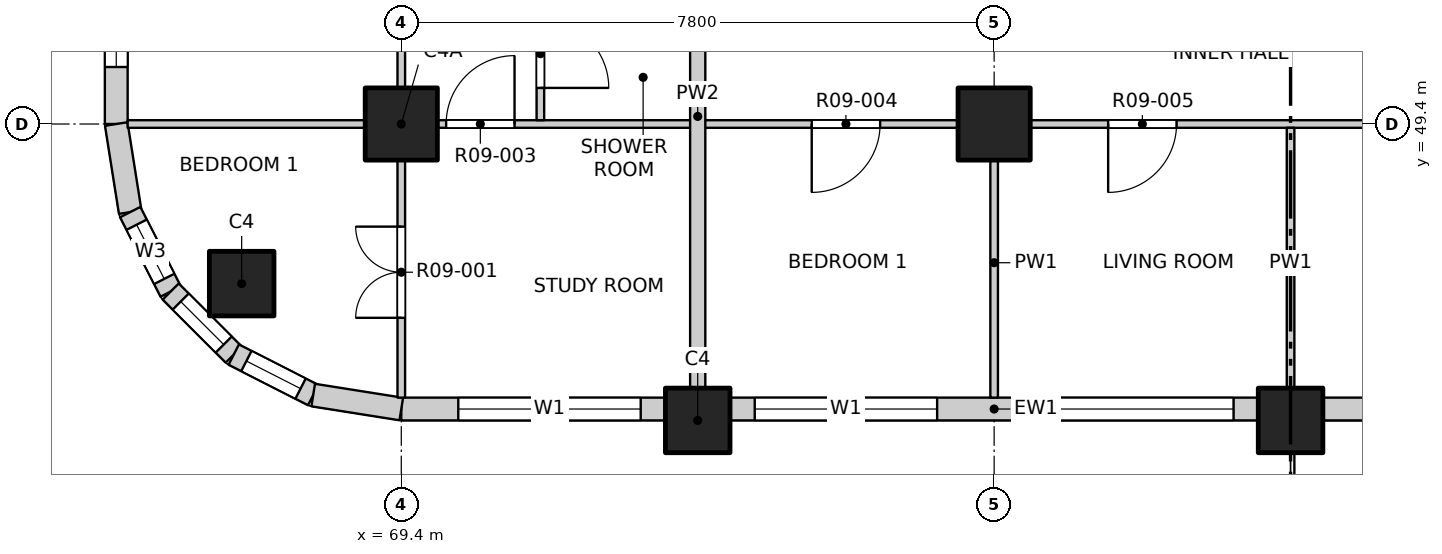
"""IFC4 building model, lengths in metres.
Left out: names, types, materials, properties, quantities, classifications, styles, units other than length and angle.
Written with IfcOpenShell. Run it as: python <this file> out.ifc"""

import sys

from ifc_helpers import new_model, si_unit, direction, frame, frame_2d, origin, origin_2d, place, context, subcontext, project, spatial, rectangle, extrude, element, fill, save


model = new_model("IFC4")
c1 = context("Model", 3, precision=1e-05, world=origin(), true_north=direction((0.0, 1.0)))
c2 = subcontext(c1, "Body", "Model", "MODEL_VIEW")
j1 = project(units=[si_unit("LENGTHUNIT", "METRE"), si_unit("PLANEANGLEUNIT", "RADIAN")], contexts=[c1])
p1 = place(None, origin())
s1 = spatial("IfcSite", under=j1, at=p1, CompositionType="ELEMENT")
p2 = place(p1, origin())
s2 = spatial("IfcBuilding", under=s1, at=p2, CompositionType="ELEMENT")
p3 = place(p2, frame((0.0, 0.0, 113.5)))
s3 = spatial("IfcBuildingStorey", under=s2, at=p3, CompositionType="ELEMENT", Elevation=113.5)
for number, where, z_axis, x_axis in (
    (1, (67.3, 47.3, -0.25), (0.0, 0.0, 1.0), (1.0, 0.0, 0.0)),
    (2, (73.3, 45.5, -0.25), (0.0, 0.0, 1.0), (1.0, 0.0, 0.0)),
    (3, (81.1, 45.5, -0.25), (0.0, 0.0, 1.0), (1.0, 0.0, 0.0)),
):
    element("IfcColumn", number, at=place(p3, frame(where, z_axis=z_axis, x_axis=x_axis)), inside=s3, PredefinedType="COLUMN", context=c2, shape_type="SweptSolid", body=[
        extrude(rectangle(XDim=0.85, YDim=0.85, at=origin_2d()), origin(), (0.0, 0.0, 1.0), 3.35),
    ])
for number, where, z_axis, x_axis in (
    (4, (69.4, 49.4, -0.25), (0.0, 0.0, 1.0), (1.0, 0.0, 0.0)),
    (5, (77.2, 49.4, -0.25), (0.0, 0.0, 1.0), (1.0, 0.0, 0.0)),
):
    element("IfcColumn", number, at=place(p3, frame(where, z_axis=z_axis, x_axis=x_axis)), inside=s3, PredefinedType="COLUMN", context=c2, shape_type="SweptSolid", body=[
        extrude(rectangle(XDim=0.95, YDim=0.95, at=origin_2d()), origin(), (0.0, 0.0, 1.0), 3.35),
    ])
p4 = place(p3, frame((69.4, 45.65, 0.0), z_axis=(0.0, 0.0, 1.0), x_axis=(1.0, 0.0, 0.0)))
e6 = element("IfcWall", 6, at=p4, inside=s3, PredefinedType="SOLIDWALL", context=c2, shape_type="SweptSolid", body=[
    extrude(rectangle(XDim=3.475, YDim=0.3, at=frame_2d((1.738, 0.0))), origin(), (0.0, 0.0, 1.0), 3.1),
])
p5 = place(p4, frame((0.75, 0.0, 0.9)))
e7 = element("IfcOpeningElement", 7, at=p5, cuts=e6, PredefinedType="OPENING", context=c2, shape_type="SweptSolid", body=[
    extrude(rectangle(XDim=2.4, YDim=1.8, at=frame_2d((1.2, 0.9))), frame((0.0, 0.16, 0.0), z_axis=(0.0, -1.0, 0.0), x_axis=(1.0, 0.0, 0.0)), (0.0, 0.0, 1.0), 0.32),
])
p6 = place(p3, frame((73.725, 45.65, 0.0), z_axis=(0.0, 0.0, 1.0), x_axis=(1.0, 0.0, 0.0)))
e8 = element("IfcWall", 8, at=p6, inside=s3, PredefinedType="SOLIDWALL", context=c2, shape_type="SweptSolid", body=[
    extrude(rectangle(XDim=6.95, YDim=0.3, at=frame_2d((3.475, 0.0))), origin(), (0.0, 0.0, 1.0), 3.1),
])
p7 = place(p6, frame((0.325, 0.0, 0.9)))
e9 = element("IfcOpeningElement", 9, at=p7, cuts=e8, PredefinedType="OPENING", context=c2, shape_type="SweptSolid", body=[
    extrude(rectangle(XDim=2.4, YDim=1.8, at=frame_2d((1.2, 0.9))), frame((0.0, 0.16, 0.0), z_axis=(0.0, -1.0, 0.0), x_axis=(1.0, 0.0, 0.0)), (0.0, 0.0, 1.0), 0.32),
])
p8 = place(p6, frame((4.225, 0.0, 0.9)))
e10 = element("IfcOpeningElement", 10, at=p8, cuts=e8, PredefinedType="OPENING", context=c2, shape_type="SweptSolid", body=[
    extrude(rectangle(XDim=2.4, YDim=1.8, at=frame_2d((1.2, 0.9))), frame((0.0, 0.16, 0.0), z_axis=(0.0, -1.0, 0.0), x_axis=(1.0, 0.0, 0.0)), (0.0, 0.0, 1.0), 0.32),
])
p9 = place(p3, frame((81.525, 45.65, 0.0), z_axis=(0.0, 0.0, 1.0), x_axis=(1.0, 0.0, 0.0)))
e11 = element("IfcWall", 11, at=p9, inside=s3, PredefinedType="SOLIDWALL", context=c2, shape_type="SweptSolid", body=[
    extrude(rectangle(XDim=6.95, YDim=0.3, at=frame_2d((3.475, 0.0))), origin(), (0.0, 0.0, 1.0), 3.1),
])
p10 = place(p9, frame((0.625, 0.0, 0.0)))
e12 = element("IfcOpeningElement", 12, at=p10, cuts=e11, PredefinedType="OPENING", context=c2, shape_type="SweptSolid", body=[
    extrude(rectangle(XDim=1.8, YDim=2.4, at=frame_2d((0.9, 1.2))), frame((0.0, 0.16, 0.0), z_axis=(0.0, -1.0, 0.0), x_axis=(1.0, 0.0, 0.0)), (0.0, 0.0, 1.0), 0.32),
])
p11 = place(p9, frame((4.225, 0.0, 0.9)))
e13 = element("IfcOpeningElement", 13, at=p11, cuts=e11, PredefinedType="OPENING", context=c2, shape_type="SweptSolid", body=[
    extrude(rectangle(XDim=2.4, YDim=1.8, at=frame_2d((1.2, 0.9))), frame((0.0, 0.16, 0.0), z_axis=(0.0, -1.0, 0.0), x_axis=(1.0, 0.0, 0.0)), (0.0, 0.0, 1.0), 0.32),
])
p12 = place(p3, frame((65.65, 49.4, 0.0), z_axis=(0.0, 0.0, 1.0), x_axis=(0.0, 1.0, 0.0)))
e14 = element("IfcWall", 14, at=p12, inside=s3, PredefinedType="SOLIDWALL", context=c2, shape_type="SweptSolid", body=[
    extrude(rectangle(XDim=3.475, YDim=0.3, at=frame_2d((1.738, 0.0))), origin(), (0.0, 0.0, 1.0), 3.1),
])
p13 = place(p12, frame((0.75, 0.0, 0.9)))
e15 = element("IfcOpeningElement", 15, at=p13, cuts=e14, PredefinedType="OPENING", context=c2, shape_type="SweptSolid", body=[
    extrude(rectangle(XDim=2.4, YDim=1.8, at=frame_2d((1.2, 0.9))), frame((0.0, 0.16, 0.0), z_axis=(0.0, -1.0, 0.0), x_axis=(1.0, 0.0, 0.0)), (0.0, 0.0, 1.0), 0.32),
])
p14 = place(p3, frame((65.65, 49.4, 0.0), z_axis=(0.0, 0.0, 1.0), x_axis=(0.156496880861, -0.987678452879, 0.0)))
e16 = element("IfcWall", 16, at=p14, inside=s3, PredefinedType="SOLIDWALL", context=c2, shape_type="SweptSolid", body=[
    extrude(rectangle(XDim=1.173, YDim=0.3, at=frame_2d((0.586, 0.0))), origin(), (0.0, 0.0, 1.0), 3.1),
])
p15 = place(p3, frame((65.833, 48.241, 0.0), z_axis=(0.0, 0.0, 1.0), x_axis=(0.454025524128, -0.890988677504, 0.0)))
e17 = element("IfcWall", 17, at=p15, inside=s3, PredefinedType="SOLIDWALL", context=c2, shape_type="SweptSolid", body=[
    extrude(rectangle(XDim=1.173, YDim=0.3, at=frame_2d((0.587, 0.0))), origin(), (0.0, 0.0, 1.0), 3.1),
])
p16 = place(p15, frame((0.187, 0.0, 0.9)))
e18 = element("IfcOpeningElement", 18, at=p16, cuts=e17, PredefinedType="OPENING", context=c2, shape_type="SweptSolid", body=[
    extrude(rectangle(XDim=0.8, YDim=1.2, at=frame_2d((0.4, 0.6))), frame((0.0, 0.16, 0.0), z_axis=(0.0, -1.0, 0.0), x_axis=(1.0, 0.0, 0.0)), (0.0, 0.0, 1.0), 0.32),
])
p17 = place(p3, frame((66.366, 47.196, 0.0), z_axis=(0.0, 0.0, 1.0), x_axis=(0.707106781187, -0.707106781187, 0.0)))
e19 = element("IfcWall", 19, at=p17, inside=s3, PredefinedType="SOLIDWALL", context=c2, shape_type="SweptSolid", body=[
    extrude(rectangle(XDim=1.173, YDim=0.3, at=frame_2d((0.586, 0.0))), origin(), (0.0, 0.0, 1.0), 3.1),
])
p18 = place(p17, frame((0.187, 0.0, 0.9)))
e20 = element("IfcOpeningElement", 20, at=p18, cuts=e19, PredefinedType="OPENING", context=c2, shape_type="SweptSolid", body=[
    extrude(rectangle(XDim=0.8, YDim=1.2, at=frame_2d((0.4, 0.6))), frame((0.0, 0.16, 0.0), z_axis=(0.0, -1.0, 0.0), x_axis=(1.0, 0.0, 0.0)), (0.0, 0.0, 1.0), 0.32),
])
p19 = place(p3, frame((67.196, 46.366, 0.0), z_axis=(0.0, 0.0, 1.0), x_axis=(0.890988677504, -0.454025524128, 0.0)))
e21 = element("IfcWall", 21, at=p19, inside=s3, PredefinedType="SOLIDWALL", context=c2, shape_type="SweptSolid", body=[
    extrude(rectangle(XDim=1.173, YDim=0.3, at=frame_2d((0.587, 0.0))), origin(), (0.0, 0.0, 1.0), 3.1),
])
p20 = place(p19, frame((0.187, 0.0, 0.9)))
e22 = element("IfcOpeningElement", 22, at=p20, cuts=e21, PredefinedType="OPENING", context=c2, shape_type="SweptSolid", body=[
    extrude(rectangle(XDim=0.8, YDim=1.2, at=frame_2d((0.4, 0.6))), frame((0.0, 0.16, 0.0), z_axis=(0.0, -1.0, 0.0), x_axis=(1.0, 0.0, 0.0)), (0.0, 0.0, 1.0), 0.32),
])
p21 = place(p3, frame((68.241, 45.833, 0.0), z_axis=(0.0, 0.0, 1.0), x_axis=(0.987678452879, -0.156496880861, 0.0)))
e23 = element("IfcWall", 23, at=p21, inside=s3, PredefinedType="SOLIDWALL", context=c2, shape_type="SweptSolid", body=[
    extrude(rectangle(XDim=1.173, YDim=0.3, at=frame_2d((0.586, 0.0))), origin(), (0.0, 0.0, 1.0), 3.1),
])
p22 = place(p3, frame((65.8, 49.4, 0.0), z_axis=(0.0, 0.0, 1.0), x_axis=(1.0, 0.0, 0.0)))
e24 = element("IfcWall", 24, at=p22, inside=s3, PredefinedType="PARTITIONING", context=c2, shape_type="SweptSolid", body=[
    extrude(rectangle(XDim=38.4, YDim=0.1, at=frame_2d((19.2, 0.0))), origin(), (0.0, 0.0, 1.0), 3.1),
])
p23 = place(p22, frame((4.19, 0.0, 0.0)))
e25 = element("IfcOpeningElement", 25, at=p23, cuts=e24, PredefinedType="OPENING", context=c2, shape_type="SweptSolid", body=[
    extrude(rectangle(XDim=0.9, YDim=2.1, at=frame_2d((0.45, 1.05))), frame((0.0, 0.06, 0.0), z_axis=(0.0, -1.0, 0.0), x_axis=(1.0, 0.0, 0.0)), (0.0, 0.0, 1.0), 0.12),
])
p24 = place(p22, frame((9.0, 0.0, 0.0)))
e26 = element("IfcOpeningElement", 26, at=p24, cuts=e24, PredefinedType="OPENING", context=c2, shape_type="SweptSolid", body=[
    extrude(rectangle(XDim=0.9, YDim=2.1, at=frame_2d((0.45, 1.05))), frame((0.0, 0.06, 0.0), z_axis=(0.0, -1.0, 0.0), x_axis=(1.0, 0.0, 0.0)), (0.0, 0.0, 1.0), 0.12),
])
p25 = place(p22, frame((12.9, 0.0, 0.0)))
e27 = element("IfcOpeningElement", 27, at=p25, cuts=e24, PredefinedType="OPENING", context=c2, shape_type="SweptSolid", body=[
    extrude(rectangle(XDim=0.9, YDim=2.1, at=frame_2d((0.45, 1.05))), frame((0.0, 0.06, 0.0), z_axis=(0.0, -1.0, 0.0), x_axis=(1.0, 0.0, 0.0)), (0.0, 0.0, 1.0), 0.12),
])
p26 = place(p22, frame((16.8, 0.0, 0.0)))
e28 = element("IfcOpeningElement", 28, at=p26, cuts=e24, PredefinedType="OPENING", context=c2, shape_type="SweptSolid", body=[
    extrude(rectangle(XDim=0.9, YDim=2.1, at=frame_2d((0.45, 1.05))), frame((0.0, 0.06, 0.0), z_axis=(0.0, -1.0, 0.0), x_axis=(1.0, 0.0, 0.0)), (0.0, 0.0, 1.0), 0.12),
])
p27 = place(p22, frame((20.7, 0.0, 0.0)))
e29 = element("IfcOpeningElement", 29, at=p27, cuts=e24, PredefinedType="OPENING", context=c2, shape_type="SweptSolid", body=[
    extrude(rectangle(XDim=0.9, YDim=2.1, at=frame_2d((0.45, 1.05))), frame((0.0, 0.06, 0.0), z_axis=(0.0, -1.0, 0.0), x_axis=(1.0, 0.0, 0.0)), (0.0, 0.0, 1.0), 0.12),
])
p28 = place(p22, frame((24.6, 0.0, 0.0)))
e30 = element("IfcOpeningElement", 30, at=p28, cuts=e24, PredefinedType="OPENING", context=c2, shape_type="SweptSolid", body=[
    extrude(rectangle(XDim=0.9, YDim=2.1, at=frame_2d((0.45, 1.05))), frame((0.0, 0.06, 0.0), z_axis=(0.0, -1.0, 0.0), x_axis=(1.0, 0.0, 0.0)), (0.0, 0.0, 1.0), 0.12),
])
p29 = place(p22, frame((28.5, 0.0, 0.0)))
e31 = element("IfcOpeningElement", 31, at=p29, cuts=e24, PredefinedType="OPENING", context=c2, shape_type="SweptSolid", body=[
    extrude(rectangle(XDim=0.9, YDim=2.1, at=frame_2d((0.45, 1.05))), frame((0.0, 0.06, 0.0), z_axis=(0.0, -1.0, 0.0), x_axis=(1.0, 0.0, 0.0)), (0.0, 0.0, 1.0), 0.12),
])
p30 = place(p22, frame((33.31, 0.0, 0.0)))
e32 = element("IfcOpeningElement", 32, at=p30, cuts=e24, PredefinedType="OPENING", context=c2, shape_type="SweptSolid", body=[
    extrude(rectangle(XDim=0.9, YDim=2.1, at=frame_2d((0.45, 1.05))), frame((0.0, 0.06, 0.0), z_axis=(0.0, -1.0, 0.0), x_axis=(1.0, 0.0, 0.0)), (0.0, 0.0, 1.0), 0.12),
])
p31 = place(p3, frame((69.4, 45.8, 0.0), z_axis=(0.0, 0.0, 1.0), x_axis=(0.0, 1.0, 0.0)))
e33 = element("IfcWall", 33, at=p31, inside=s3, PredefinedType="PARTITIONING", context=c2, shape_type="SweptSolid", body=[
    extrude(rectangle(XDim=38.4, YDim=0.1, at=frame_2d((19.2, 0.0))), origin(), (0.0, 0.0, 1.0), 3.1),
])
p32 = place(p31, frame((1.05, 0.0, 0.0)))
e34 = element("IfcOpeningElement", 34, at=p32, cuts=e33, PredefinedType="OPENING", context=c2, shape_type="SweptSolid", body=[
    extrude(rectangle(XDim=1.2, YDim=2.1, at=frame_2d((0.6, 1.05))), frame((0.0, 0.06, 0.0), z_axis=(0.0, -1.0, 0.0), x_axis=(1.0, 0.0, 0.0)), (0.0, 0.0, 1.0), 0.12),
])
p33 = place(p31, frame((5.1, 0.0, 0.0)))
e35 = element("IfcOpeningElement", 35, at=p33, cuts=e33, PredefinedType="OPENING", context=c2, shape_type="SweptSolid", body=[
    extrude(rectangle(XDim=0.9, YDim=2.1, at=frame_2d((0.45, 1.05))), frame((0.0, 0.06, 0.0), z_axis=(0.0, -1.0, 0.0), x_axis=(1.0, 0.0, 0.0)), (0.0, 0.0, 1.0), 0.12),
])
p34 = place(p31, frame((9.0, 0.0, 0.0)))
e36 = element("IfcOpeningElement", 36, at=p34, cuts=e33, PredefinedType="OPENING", context=c2, shape_type="SweptSolid", body=[
    extrude(rectangle(XDim=0.9, YDim=2.1, at=frame_2d((0.45, 1.05))), frame((0.0, 0.06, 0.0), z_axis=(0.0, -1.0, 0.0), x_axis=(1.0, 0.0, 0.0)), (0.0, 0.0, 1.0), 0.12),
])
p35 = place(p31, frame((12.9, 0.0, 0.0)))
e37 = element("IfcOpeningElement", 37, at=p35, cuts=e33, PredefinedType="OPENING", context=c2, shape_type="SweptSolid", body=[
    extrude(rectangle(XDim=0.9, YDim=2.1, at=frame_2d((0.45, 1.05))), frame((0.0, 0.06, 0.0), z_axis=(0.0, -1.0, 0.0), x_axis=(1.0, 0.0, 0.0)), (0.0, 0.0, 1.0), 0.12),
])
p36 = place(p31, frame((16.8, 0.0, 0.0)))
e38 = element("IfcOpeningElement", 38, at=p36, cuts=e33, PredefinedType="OPENING", context=c2, shape_type="SweptSolid", body=[
    extrude(rectangle(XDim=0.9, YDim=2.1, at=frame_2d((0.45, 1.05))), frame((0.0, 0.06, 0.0), z_axis=(0.0, -1.0, 0.0), x_axis=(1.0, 0.0, 0.0)), (0.0, 0.0, 1.0), 0.12),
])
p37 = place(p31, frame((20.7, 0.0, 0.0)))
e39 = element("IfcOpeningElement", 39, at=p37, cuts=e33, PredefinedType="OPENING", context=c2, shape_type="SweptSolid", body=[
    extrude(rectangle(XDim=0.9, YDim=2.1, at=frame_2d((0.45, 1.05))), frame((0.0, 0.06, 0.0), z_axis=(0.0, -1.0, 0.0), x_axis=(1.0, 0.0, 0.0)), (0.0, 0.0, 1.0), 0.12),
])
p38 = place(p31, frame((24.6, 0.0, 0.0)))
e40 = element("IfcOpeningElement", 40, at=p38, cuts=e33, PredefinedType="OPENING", context=c2, shape_type="SweptSolid", body=[
    extrude(rectangle(XDim=0.9, YDim=2.1, at=frame_2d((0.45, 1.05))), frame((0.0, 0.06, 0.0), z_axis=(0.0, -1.0, 0.0), x_axis=(1.0, 0.0, 0.0)), (0.0, 0.0, 1.0), 0.12),
])
p39 = place(p31, frame((28.5, 0.0, 0.0)))
e41 = element("IfcOpeningElement", 41, at=p39, cuts=e33, PredefinedType="OPENING", context=c2, shape_type="SweptSolid", body=[
    extrude(rectangle(XDim=0.9, YDim=2.1, at=frame_2d((0.45, 1.05))), frame((0.0, 0.06, 0.0), z_axis=(0.0, -1.0, 0.0), x_axis=(1.0, 0.0, 0.0)), (0.0, 0.0, 1.0), 0.12),
])
p40 = place(p31, frame((32.4, 0.0, 0.0)))
e42 = element("IfcOpeningElement", 42, at=p40, cuts=e33, PredefinedType="OPENING", context=c2, shape_type="SweptSolid", body=[
    extrude(rectangle(XDim=0.9, YDim=2.1, at=frame_2d((0.45, 1.05))), frame((0.0, 0.06, 0.0), z_axis=(0.0, -1.0, 0.0), x_axis=(1.0, 0.0, 0.0)), (0.0, 0.0, 1.0), 0.12),
])
p41 = place(p31, frame((36.15, 0.0, 0.0)))
e43 = element("IfcOpeningElement", 43, at=p41, cuts=e33, PredefinedType="OPENING", context=c2, shape_type="SweptSolid", body=[
    extrude(rectangle(XDim=1.2, YDim=2.1, at=frame_2d((0.6, 1.05))), frame((0.0, 0.06, 0.0), z_axis=(0.0, -1.0, 0.0), x_axis=(1.0, 0.0, 0.0)), (0.0, 0.0, 1.0), 0.12),
])
p42 = place(p3, frame((71.23, 49.45, 0.0), z_axis=(0.0, 0.0, 1.0), x_axis=(0.0, 1.0, 0.0)))
e44 = element("IfcWall", 44, at=p42, inside=s3, PredefinedType="PARTITIONING", context=c2, shape_type="SweptSolid", body=[
    extrude(rectangle(XDim=4.65, YDim=0.1, at=frame_2d((2.325, 0.0))), origin(), (0.0, 0.0, 1.0), 3.1),
])
p43 = place(p42, frame((0.425, 0.0, 0.0)))
e45 = element("IfcOpeningElement", 45, at=p43, cuts=e44, PredefinedType="OPENING", context=c2, shape_type="SweptSolid", body=[
    extrude(rectangle(XDim=0.9, YDim=2.1, at=frame_2d((0.45, 1.05))), frame((0.0, 0.06, 0.0), z_axis=(0.0, -1.0, 0.0), x_axis=(1.0, 0.0, 0.0)), (0.0, 0.0, 1.0), 0.12),
])
p44 = place(p42, frame((2.85, 0.0, 0.0)))
e46 = element("IfcOpeningElement", 46, at=p44, cuts=e44, PredefinedType="OPENING", context=c2, shape_type="SweptSolid", body=[
    extrude(rectangle(XDim=0.8, YDim=2.1, at=frame_2d((0.4, 1.05))), frame((0.0, 0.06, 0.0), z_axis=(0.0, -1.0, 0.0), x_axis=(1.0, 0.0, 0.0)), (0.0, 0.0, 1.0), 0.12),
])
p45 = place(p3, frame((73.3, 45.8, 0.0), z_axis=(0.0, 0.0, 1.0), x_axis=(0.0, 1.0, 0.0)))
e47 = element("IfcWall", 47, at=p45, inside=s3, PredefinedType="PARTITIONING", context=c2, shape_type="SweptSolid", body=[
    extrude(rectangle(XDim=7.4, YDim=0.2, at=frame_2d((3.7, 0.0))), origin(), (0.0, 0.0, 1.0), 3.1),
])
for number, where, z_axis, x_axis in (
    (48, (77.2, 45.8, 0.0), (0.0, 0.0, 1.0), (0.0, 1.0, 0.0)),
    (49, (81.1, 45.8, 0.0), (0.0, 0.0, 1.0), (0.0, 1.0, 0.0)),
):
    element("IfcWall", number, at=place(p3, frame(where, z_axis=z_axis, x_axis=x_axis)), inside=s3, PredefinedType="PARTITIONING", context=c2, shape_type="SweptSolid", body=[
        extrude(rectangle(XDim=3.55, YDim=0.1, at=frame_2d((1.775, 0.0))), origin(), (0.0, 0.0, 1.0), 3.1),
    ])
p46 = place(p5, origin())
e50 = element("IfcWindow", 50, at=p46, inside=s3, PartitioningType="DOUBLE_PANEL_VERTICAL", PredefinedType="WINDOW", context=c2, shape_type="SweptSolid", body=[
    extrude(rectangle(XDim=2.4, YDim=1.8, at=frame_2d((1.2, 0.9))), frame((0.0, 0.03, 0.0), z_axis=(0.0, -1.0, 0.0), x_axis=(1.0, 0.0, 0.0)), (0.0, 0.0, 1.0), 0.06),
])
fill(e7, e50)
p47 = place(p7, origin())
e51 = element("IfcWindow", 51, at=p47, inside=s3, PartitioningType="DOUBLE_PANEL_VERTICAL", PredefinedType="WINDOW", context=c2, shape_type="SweptSolid", body=[
    extrude(rectangle(XDim=2.4, YDim=1.8, at=frame_2d((1.2, 0.9))), frame((0.0, 0.03, 0.0), z_axis=(0.0, -1.0, 0.0), x_axis=(1.0, 0.0, 0.0)), (0.0, 0.0, 1.0), 0.06),
])
fill(e9, e51)
p48 = place(p8, origin())
e52 = element("IfcWindow", 52, at=p48, inside=s3, PartitioningType="DOUBLE_PANEL_VERTICAL", PredefinedType="WINDOW", context=c2, shape_type="SweptSolid", body=[
    extrude(rectangle(XDim=2.4, YDim=1.8, at=frame_2d((1.2, 0.9))), frame((0.0, 0.03, 0.0), z_axis=(0.0, -1.0, 0.0), x_axis=(1.0, 0.0, 0.0)), (0.0, 0.0, 1.0), 0.06),
])
fill(e10, e52)
p49 = place(p13, origin())
e53 = element("IfcWindow", 53, at=p49, inside=s3, PartitioningType="DOUBLE_PANEL_VERTICAL", PredefinedType="WINDOW", context=c2, shape_type="SweptSolid", body=[
    extrude(rectangle(XDim=2.4, YDim=1.8, at=frame_2d((1.2, 0.9))), frame((0.0, 0.03, 0.0), z_axis=(0.0, -1.0, 0.0), x_axis=(1.0, 0.0, 0.0)), (0.0, 0.0, 1.0), 0.06),
])
fill(e15, e53)
p50 = place(p16, origin())
e54 = element("IfcWindow", 54, at=p50, inside=s3, PartitioningType="SINGLE_PANEL", PredefinedType="WINDOW", context=c2, shape_type="SweptSolid", body=[
    extrude(rectangle(XDim=0.8, YDim=1.2, at=frame_2d((0.4, 0.6))), frame((0.0, 0.03, 0.0), z_axis=(0.0, -1.0, 0.0), x_axis=(1.0, 0.0, 0.0)), (0.0, 0.0, 1.0), 0.06),
])
fill(e18, e54)
p51 = place(p18, origin())
e55 = element("IfcWindow", 55, at=p51, inside=s3, PartitioningType="SINGLE_PANEL", PredefinedType="WINDOW", context=c2, shape_type="SweptSolid", body=[
    extrude(rectangle(XDim=0.8, YDim=1.2, at=frame_2d((0.4, 0.6))), frame((0.0, 0.03, 0.0), z_axis=(0.0, -1.0, 0.0), x_axis=(1.0, 0.0, 0.0)), (0.0, 0.0, 1.0), 0.06),
])
fill(e20, e55)
p52 = place(p20, origin())
e56 = element("IfcWindow", 56, at=p52, inside=s3, PartitioningType="SINGLE_PANEL", PredefinedType="WINDOW", context=c2, shape_type="SweptSolid", body=[
    extrude(rectangle(XDim=0.8, YDim=1.2, at=frame_2d((0.4, 0.6))), frame((0.0, 0.03, 0.0), z_axis=(0.0, -1.0, 0.0), x_axis=(1.0, 0.0, 0.0)), (0.0, 0.0, 1.0), 0.06),
])
fill(e22, e56)
p53 = place(p32, origin())
e57 = element("IfcDoor", 57, at=p53, inside=s3, OperationType="DOUBLE_DOOR_SINGLE_SWING", PredefinedType="DOOR", context=c2, shape_type="SweptSolid", body=[
    extrude(rectangle(XDim=1.2, YDim=2.1, at=frame_2d((0.6, 1.05))), frame((0.0, 0.025, 0.0), z_axis=(0.0, -1.0, 0.0), x_axis=(1.0, 0.0, 0.0)), (0.0, 0.0, 1.0), 0.05),
])
fill(e34, e57)
p54 = place(p23, origin())
e58 = element("IfcDoor", 58, at=p54, inside=s3, OperationType="SINGLE_SWING_RIGHT", PredefinedType="DOOR", context=c2, shape_type="SweptSolid", body=[
    extrude(rectangle(XDim=0.9, YDim=2.1, at=frame_2d((0.45, 1.05))), frame((0.0, 0.025, 0.0), z_axis=(0.0, -1.0, 0.0), x_axis=(1.0, 0.0, 0.0)), (0.0, 0.0, 1.0), 0.05),
])
fill(e25, e58)
p55 = place(p24, origin())
e59 = element("IfcDoor", 59, at=p55, inside=s3, OperationType="SINGLE_SWING_RIGHT", PredefinedType="DOOR", context=c2, shape_type="SweptSolid", body=[
    extrude(rectangle(XDim=0.9, YDim=2.1, at=frame_2d((0.45, 1.05))), frame((0.0, 0.025, 0.0), z_axis=(0.0, -1.0, 0.0), x_axis=(1.0, 0.0, 0.0)), (0.0, 0.0, 1.0), 0.05),
])
fill(e26, e59)
p56 = place(p25, origin())
e60 = element("IfcDoor", 60, at=p56, inside=s3, OperationType="SINGLE_SWING_RIGHT", PredefinedType="DOOR", context=c2, shape_type="SweptSolid", body=[
    extrude(rectangle(XDim=0.9, YDim=2.1, at=frame_2d((0.45, 1.05))), frame((0.0, 0.025, 0.0), z_axis=(0.0, -1.0, 0.0), x_axis=(1.0, 0.0, 0.0)), (0.0, 0.0, 1.0), 0.05),
])
fill(e27, e60)
p57 = place(p43, origin())
e61 = element("IfcDoor", 61, at=p57, inside=s3, OperationType="SINGLE_SWING_RIGHT", PredefinedType="DOOR", context=c2, shape_type="SweptSolid", body=[
    extrude(rectangle(XDim=0.9, YDim=2.1, at=frame_2d((0.45, 1.05))), frame((0.0, 0.025, 0.0), z_axis=(0.0, -1.0, 0.0), x_axis=(1.0, 0.0, 0.0)), (0.0, 0.0, 1.0), 0.05),
])
fill(e45, e61)
save(model, sys.argv[1])
